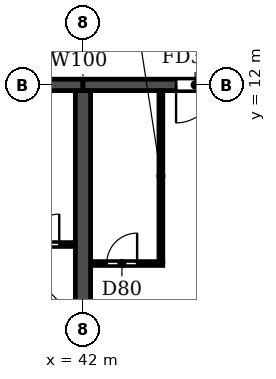
"""IFC4 building model, lengths in metres.
Left out: names, types, materials, properties, quantities, classifications, styles, units other than length and angle.
Written with IfcOpenShell. Run it as: python <this file> out.ifc"""

import sys

from ifc_helpers import new_model, si_unit, direction, frame, frame_2d, origin, place, context, subcontext, project, spatial, rectangle, extrude, element, fill, save


model = new_model("IFC4")
c1 = context("Model", 3, precision=1e-05, world=origin(), true_north=direction((0.0, 1.0)))
c2 = subcontext(c1, "Body", "Model", "MODEL_VIEW")
j1 = project(units=[si_unit("LENGTHUNIT", "METRE"), si_unit("PLANEANGLEUNIT", "RADIAN")], contexts=[c1])
p1 = place(None, origin())
s1 = spatial("IfcSite", under=j1, at=p1, CompositionType="ELEMENT")
p2 = place(p1, origin())
s2 = spatial("IfcBuilding", under=s1, at=p2, CompositionType="ELEMENT")
p3 = place(p2, frame((0.0, 0.0, 23.4)))
s3 = spatial("IfcBuildingStorey", under=s2, at=p3, CompositionType="ELEMENT", Elevation=23.4)
p4 = place(p3, frame((42.0, 0.2, 0.0), z_axis=(0.0, 0.0, 1.0), x_axis=(0.0, 1.0, 0.0)))
e1 = element("IfcWall", 1, at=p4, inside=s3, PredefinedType="SHEAR", context=c2, shape_type="SweptSolid", body=[
    extrude(rectangle(XDim=11.65, YDim=0.4, at=frame_2d((5.825, 0.0))), origin(), (0.0, 0.0, 1.0), 3.05),
])
p5 = place(p3, frame((36.0, 12.0, 0.0), z_axis=(0.0, 0.0, 1.0), x_axis=(1.0, 0.0, 0.0)))
e2 = element("IfcWall", 2, at=p5, inside=s3, PredefinedType="SHEAR", context=c2, shape_type="SweptSolid", body=[
    extrude(rectangle(XDim=6.0, YDim=0.3, at=frame_2d((3.0, 0.0))), origin(), (0.0, 0.0, 1.0), 2.45),
])
p6 = place(p5, frame((2.55, 0.0, 0.0)))
e3 = element("IfcOpeningElement", 3, at=p6, cuts=e2, PredefinedType="OPENING", context=c2, shape_type="SweptSolid", body=[
    extrude(rectangle(XDim=1.0, YDim=2.1, at=frame_2d((0.5, 1.05))), frame((0.0, 0.16, 0.0), z_axis=(0.0, -1.0, 0.0), x_axis=(1.0, 0.0, 0.0)), (0.0, 0.0, 1.0), 0.32),
])
p7 = place(p3, frame((42.0, 12.0, 0.0), z_axis=(0.0, 0.0, 1.0), x_axis=(1.0, 0.0, 0.0)))
e4 = element("IfcWall", 4, at=p7, inside=s3, PredefinedType="SHEAR", context=c2, shape_type="SweptSolid", body=[
    extrude(rectangle(XDim=6.0, YDim=0.3, at=frame_2d((3.0, 0.0))), origin(), (0.0, 0.0, 1.0), 2.45),
])
p8 = place(p7, frame((2.45, 0.0, 0.0)))
e5 = element("IfcOpeningElement", 5, at=p8, cuts=e4, PredefinedType="OPENING", context=c2, shape_type="SweptSolid", body=[
    extrude(rectangle(XDim=1.0, YDim=2.1, at=frame_2d((0.5, 1.05))), frame((0.0, 0.16, 0.0), z_axis=(0.0, -1.0, 0.0), x_axis=(1.0, 0.0, 0.0)), (0.0, 0.0, 1.0), 0.32),
])
p9 = place(p3, frame((42.21, 7.3, 0.0), z_axis=(0.0, 0.0, 1.0), x_axis=(1.0, 0.0, 0.0)))
e6 = element("IfcWall", 6, at=p9, inside=s3, PredefinedType="PARTITIONING", context=c2, shape_type="SweptSolid", body=[
    extrude(rectangle(XDim=1.89, YDim=0.1, at=frame_2d((0.945, 0.0))), origin(), (0.0, 0.0, 1.0), 3.05),
])
p10 = place(p9, frame((0.415, 0.0, 0.0)))
e7 = element("IfcOpeningElement", 7, at=p10, cuts=e6, PredefinedType="OPENING", context=c2, shape_type="SweptSolid", body=[
    extrude(rectangle(XDim=0.8, YDim=2.1, at=frame_2d((0.4, 1.05))), frame((0.0, 0.06, 0.0), z_axis=(0.0, -1.0, 0.0), x_axis=(1.0, 0.0, 0.0)), (0.0, 0.0, 1.0), 0.12),
])
p11 = place(p3, frame((39.9, 7.8, 0.0), z_axis=(0.0, 0.0, 1.0), x_axis=(1.0, 0.0, 0.0)))
e8 = element("IfcWall", 8, at=p11, inside=s3, PredefinedType="PARTITIONING", context=c2, shape_type="SweptSolid", body=[
    extrude(rectangle(XDim=1.89, YDim=0.1, at=frame_2d((0.945, 0.0))), origin(), (0.0, 0.0, 1.0), 3.05),
])
p12 = place(p11, frame((0.675, 0.0, 0.0)))
e9 = element("IfcOpeningElement", 9, at=p12, cuts=e8, PredefinedType="OPENING", context=c2, shape_type="SweptSolid", body=[
    extrude(rectangle(XDim=0.8, YDim=2.1, at=frame_2d((0.4, 1.05))), frame((0.0, 0.06, 0.0), z_axis=(0.0, -1.0, 0.0), x_axis=(1.0, 0.0, 0.0)), (0.0, 0.0, 1.0), 0.12),
])
p13 = place(p3, frame((44.05, 7.35, 0.0), z_axis=(0.0, 0.0, 1.0), x_axis=(0.0, 1.0, 0.0)))
e10 = element("IfcWall", 10, at=p13, inside=s3, PredefinedType="PARTITIONING", context=c2, shape_type="SweptSolid", body=[
    extrude(rectangle(XDim=4.49, YDim=0.1, at=frame_2d((2.245, 0.0))), origin(), (0.0, 0.0, 1.0), 3.05),
])
p14 = place(p12, origin())
e11 = element("IfcDoor", 11, at=p14, inside=s3, OperationType="SINGLE_SWING_RIGHT", PredefinedType="DOOR", context=c2, shape_type="SweptSolid", body=[
    extrude(rectangle(XDim=0.8, YDim=2.1, at=frame_2d((0.4, 1.05))), frame((0.0, 0.025, 0.0), z_axis=(0.0, -1.0, 0.0), x_axis=(1.0, 0.0, 0.0)), (0.0, 0.0, 1.0), 0.05),
])
fill(e9, e11)
p15 = place(p10, origin())
e12 = element("IfcDoor", 12, at=p15, inside=s3, OperationType="SINGLE_SWING_RIGHT", PredefinedType="DOOR", context=c2, shape_type="SweptSolid", body=[
    extrude(rectangle(XDim=0.8, YDim=2.1, at=frame_2d((0.4, 1.05))), frame((0.0, 0.025, 0.0), z_axis=(0.0, -1.0, 0.0), x_axis=(1.0, 0.0, 0.0)), (0.0, 0.0, 1.0), 0.05),
])
fill(e7, e12)
p16 = place(p8, frame((1.0, 0.0, 0.0), z_axis=(0.0, 0.0, 1.0), x_axis=(-1.0, 0.0, 0.0)))
e13 = element("IfcDoor", 13, at=p16, inside=s3, OperationType="SINGLE_SWING_RIGHT", PredefinedType="DOOR", context=c2, shape_type="SweptSolid", body=[
    extrude(rectangle(XDim=1.0, YDim=2.1, at=frame_2d((0.5, 1.05))), frame((0.0, 0.025, 0.0), z_axis=(0.0, -1.0, 0.0), x_axis=(1.0, 0.0, 0.0)), (0.0, 0.0, 1.0), 0.05),
])
fill(e5, e13)
save(model, sys.argv[1])
